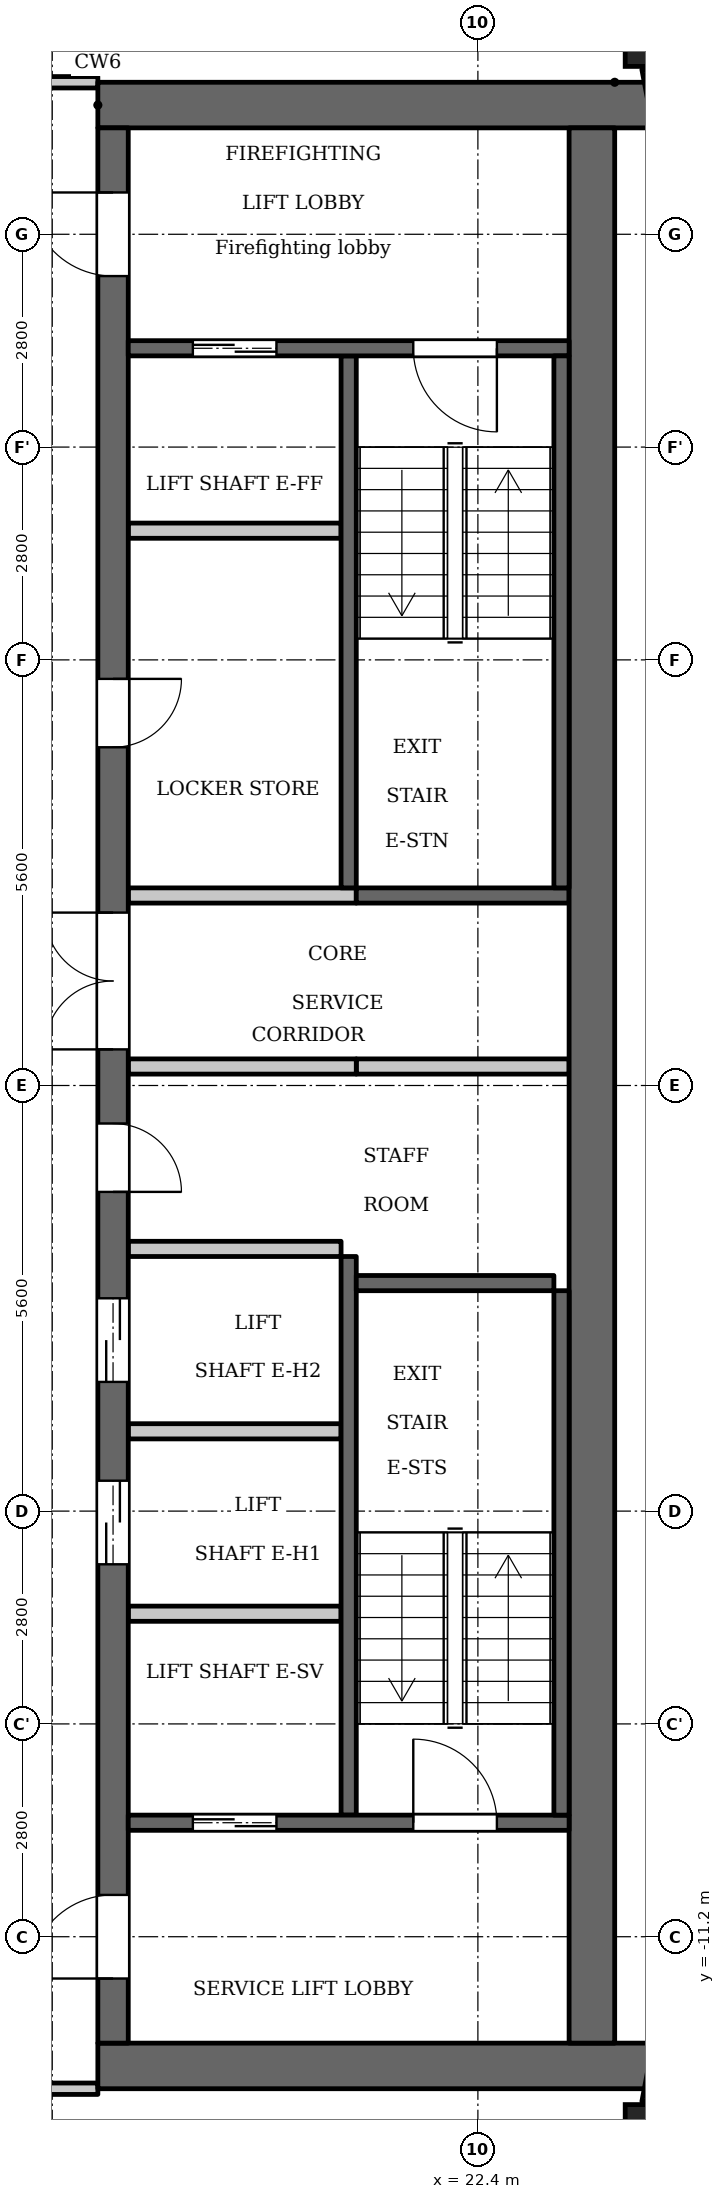
"""IFC4 building model, lengths in metres.
Left out: names, types, materials, properties, quantities, classifications, styles, units other than length and angle.
Written with IfcOpenShell. Run it as: python <this file> out.ifc"""

import sys

from ifc_helpers import new_model, si_unit, direction, frame, frame_2d, origin, origin_2d, place, context, subcontext, project, spatial, rectangle, extrude, element, fill, save


model = new_model("IFC4")
c1 = context("Model", 3, precision=1e-05, world=origin(), true_north=direction((0.0, 1.0)))
c2 = subcontext(c1, "Body", "Model", "MODEL_VIEW")
j1 = project(units=[si_unit("LENGTHUNIT", "METRE"), si_unit("PLANEANGLEUNIT", "RADIAN")], contexts=[c1])
p1 = place(None, origin())
s1 = spatial("IfcSite", under=j1, at=p1, CompositionType="ELEMENT")
p2 = place(p1, origin())
s2 = spatial("IfcBuilding", under=s1, at=p2, CompositionType="ELEMENT")
p3 = place(p2, frame((0.0, 0.0, 255.7)))
s3 = spatial("IfcBuildingStorey", under=s2, at=p3, CompositionType="ELEMENT", Elevation=255.7)
for number, where, z_axis, x_axis in (
    (1, (24.738, -13.809, 0.0), (0.0, 0.0, 1.0), (1.0, 0.0, 0.0)),
    (2, (24.738, 13.809, 0.0), (0.0, 0.0, 1.0), (1.0, 0.0, 0.0)),
):
    element("IfcColumn", number, at=place(p3, frame(where, z_axis=z_axis, x_axis=x_axis)), inside=s3, PredefinedType="COLUMN", context=c2, shape_type="SweptSolid", body=[
        extrude(rectangle(XDim=0.8, YDim=0.8, at=origin_2d()), origin(), (0.0, 0.0, 1.0), 3.5),
    ])
for number, where, z_axis, x_axis in (
    (3, (24.705, -13.395, 0.0), (0.0, 0.0, 1.0), (0.187, 0.982, 0.0)),
    (4, (25.053, 11.572, 0.0), (0.0, 0.0, 1.0), (-0.187, 0.982, 0.0)),
):
    element("IfcWall", number, at=place(p3, frame(where, z_axis=z_axis, x_axis=x_axis)), inside=s3, PredefinedType="SOLIDWALL", context=c2, shape_type="SweptSolid", body=[
        extrude(rectangle(XDim=1.856, YDim=0.3, at=frame_2d((0.928, 0.0))), origin(), (0.0, 0.0, 1.0), 2.55),
    ])
p4 = place(p3, frame((20.7, 2.6, 0.0), z_axis=(0.0, 0.0, 1.0), x_axis=(0.0, 1.0, 0.0)))
e5 = element("IfcWall", 5, at=p4, inside=s3, PredefinedType="SHEAR", context=c2, shape_type="SweptSolid", body=[
    extrude(rectangle(XDim=7.0, YDim=0.2, at=frame_2d((3.5, 0.0))), origin(), (0.0, 0.0, 1.0), 3.2),
])
p5 = place(p3, frame((20.7, -9.6, 0.0), z_axis=(0.0, 0.0, 1.0), x_axis=(0.0, 1.0, 0.0)))
e6 = element("IfcWall", 6, at=p5, inside=s3, PredefinedType="SHEAR", context=c2, shape_type="SweptSolid", body=[
    extrude(rectangle(XDim=7.35, YDim=0.2, at=frame_2d((3.675, 0.0))), origin(), (0.0, 0.0, 1.0), 3.2),
])
p6 = place(p3, frame((20.8, 2.5, 0.0), z_axis=(0.0, 0.0, 1.0), x_axis=(1.0, 0.0, 0.0)))
e7 = element("IfcWall", 7, at=p6, inside=s3, PredefinedType="SHEAR", context=c2, shape_type="SweptSolid", body=[
    extrude(rectangle(XDim=2.8, YDim=0.2, at=frame_2d((1.4, 0.0))), origin(), (0.0, 0.0, 1.0), 3.2),
])
p7 = place(p3, frame((20.8, 0.25, 0.0), z_axis=(0.0, 0.0, 1.0), x_axis=(1.0, 0.0, 0.0)))
e8 = element("IfcWall", 8, at=p7, inside=s3, PredefinedType="PARTITIONING", context=c2, shape_type="SweptSolid", body=[
    extrude(rectangle(XDim=2.8, YDim=0.2, at=frame_2d((1.4, 0.0))), origin(), (0.0, 0.0, 1.0), 3.2),
])
for number, where, z_axis, x_axis in (
    (9, (17.4, 12.9, 0.0), (0.0, 0.0, 1.0), (1.0, 0.0, 0.0)),
    (10, (17.4, -12.9, 0.0), (0.0, 0.0, 1.0), (1.0, 0.0, 0.0)),
):
    element("IfcWall", number, at=place(p3, frame(where, z_axis=z_axis, x_axis=x_axis)), inside=s3, PredefinedType="SHEAR", context=c2, shape_type="SweptSolid", body=[
        extrude(rectangle(XDim=7.32, YDim=0.6, at=frame_2d((3.66, 0.0))), origin(), (0.0, 0.0, 1.0), 3.2),
    ])
p8 = place(p3, frame((17.6, -12.6, 0.0), z_axis=(0.0, 0.0, 1.0), x_axis=(0.0, 1.0, 0.0)))
e11 = element("IfcWall", 11, at=p8, inside=s3, PredefinedType="SHEAR", context=c2, shape_type="SweptSolid", body=[
    extrude(rectangle(XDim=25.2, YDim=0.4, at=frame_2d((12.6, 0.0))), origin(), (0.0, 0.0, 1.0), 3.2),
])
p9 = place(p8, frame((6.3, 0.0, 0.0)))
e12 = element("IfcOpeningElement", 12, at=p9, cuts=e11, PredefinedType="OPENING", context=c2, shape_type="SweptSolid", body=[
    extrude(rectangle(XDim=1.1, YDim=2.1, at=frame_2d((0.55, 1.05))), frame((0.0, 0.21, 0.0), z_axis=(0.0, -1.0, 0.0), x_axis=(1.0, 0.0, 0.0)), (0.0, 0.0, 1.0), 0.42),
])
p10 = place(p8, frame((8.7, 0.0, 0.0)))
e13 = element("IfcOpeningElement", 13, at=p10, cuts=e11, PredefinedType="OPENING", context=c2, shape_type="SweptSolid", body=[
    extrude(rectangle(XDim=1.1, YDim=2.1, at=frame_2d((0.55, 1.05))), frame((0.0, 0.21, 0.0), z_axis=(0.0, -1.0, 0.0), x_axis=(1.0, 0.0, 0.0)), (0.0, 0.0, 1.0), 0.42),
])
p11 = place(p8, frame((11.2, 0.0, 0.0)))
e14 = element("IfcOpeningElement", 14, at=p11, cuts=e11, PredefinedType="OPENING", context=c2, shape_type="SweptSolid", body=[
    extrude(rectangle(XDim=0.9, YDim=2.1, at=frame_2d((0.45, 1.05))), frame((0.0, 0.21, 0.0), z_axis=(0.0, -1.0, 0.0), x_axis=(1.0, 0.0, 0.0)), (0.0, 0.0, 1.0), 0.42),
])
p12 = place(p8, frame((17.05, 0.0, 0.0)))
e15 = element("IfcOpeningElement", 15, at=p12, cuts=e11, PredefinedType="OPENING", context=c2, shape_type="SweptSolid", body=[
    extrude(rectangle(XDim=0.9, YDim=2.1, at=frame_2d((0.45, 1.05))), frame((0.0, 0.21, 0.0), z_axis=(0.0, -1.0, 0.0), x_axis=(1.0, 0.0, 0.0)), (0.0, 0.0, 1.0), 0.42),
])
p13 = place(p8, frame((23.25, 0.0, 0.0)))
e16 = element("IfcOpeningElement", 16, at=p13, cuts=e11, PredefinedType="OPENING", context=c2, shape_type="SweptSolid", body=[
    extrude(rectangle(XDim=1.1, YDim=2.1, at=frame_2d((0.55, 1.05))), frame((0.0, 0.21, 0.0), z_axis=(0.0, -1.0, 0.0), x_axis=(1.0, 0.0, 0.0)), (0.0, 0.0, 1.0), 0.42),
])
p14 = place(p8, frame((0.85, 0.0, 0.0)))
e17 = element("IfcOpeningElement", 17, at=p14, cuts=e11, PredefinedType="OPENING", context=c2, shape_type="SweptSolid", body=[
    extrude(rectangle(XDim=1.1, YDim=2.1, at=frame_2d((0.55, 1.05))), frame((0.0, 0.21, 0.0), z_axis=(0.0, -1.0, 0.0), x_axis=(1.0, 0.0, 0.0)), (0.0, 0.0, 1.0), 0.42),
])
p15 = place(p8, frame((13.075, 0.0, 0.0)))
e18 = element("IfcOpeningElement", 18, at=p15, cuts=e11, PredefinedType="OPENING", context=c2, shape_type="SweptSolid", body=[
    extrude(rectangle(XDim=1.8, YDim=2.1, at=frame_2d((0.9, 1.05))), frame((0.0, 0.21, 0.0), z_axis=(0.0, -1.0, 0.0), x_axis=(1.0, 0.0, 0.0)), (0.0, 0.0, 1.0), 0.42),
])
p16 = place(p3, frame((23.9, -12.6, 0.0), z_axis=(0.0, 0.0, 1.0), x_axis=(0.0, 1.0, 0.0)))
e19 = element("IfcWall", 19, at=p16, inside=s3, PredefinedType="SHEAR", context=c2, shape_type="SweptSolid", body=[
    extrude(rectangle(XDim=25.2, YDim=0.6, at=frame_2d((12.6, 0.0))), origin(), (0.0, 0.0, 1.0), 3.2),
])
p17 = place(p3, frame((17.8, -9.7, 0.0), z_axis=(0.0, 0.0, 1.0), x_axis=(1.0, 0.0, 0.0)))
e20 = element("IfcWall", 20, at=p17, inside=s3, PredefinedType="SHEAR", context=c2, shape_type="SweptSolid", body=[
    extrude(rectangle(XDim=5.8, YDim=0.2, at=frame_2d((2.9, 0.0))), origin(), (0.0, 0.0, 1.0), 3.2),
])
p18 = place(p17, frame((0.85, 0.0, 0.0)))
e21 = element("IfcOpeningElement", 21, at=p18, cuts=e20, PredefinedType="OPENING", context=c2, shape_type="SweptSolid", body=[
    extrude(rectangle(XDim=1.1, YDim=2.1, at=frame_2d((0.55, 1.05))), frame((0.0, 0.11, 0.0), z_axis=(0.0, -1.0, 0.0), x_axis=(1.0, 0.0, 0.0)), (0.0, 0.0, 1.0), 0.22),
])
p19 = place(p17, frame((3.75, 0.0, 0.0)))
e22 = element("IfcOpeningElement", 22, at=p19, cuts=e20, PredefinedType="OPENING", context=c2, shape_type="SweptSolid", body=[
    extrude(rectangle(XDim=1.1, YDim=2.1, at=frame_2d((0.55, 1.05))), frame((0.0, 0.11, 0.0), z_axis=(0.0, -1.0, 0.0), x_axis=(1.0, 0.0, 0.0)), (0.0, 0.0, 1.0), 0.22),
])
for number, where, z_axis, x_axis in (
    (23, (17.8, -6.95, 0.0), (0.0, 0.0, 1.0), (1.0, 0.0, 0.0)),
    (24, (17.8, -4.55, 0.0), (0.0, 0.0, 1.0), (1.0, 0.0, 0.0)),
    (25, (17.8, -2.15, 0.0), (0.0, 0.0, 1.0), (1.0, 0.0, 0.0)),
):
    element("IfcWall", number, at=place(p3, frame(where, z_axis=z_axis, x_axis=x_axis)), inside=s3, PredefinedType="PARTITIONING", context=c2, shape_type="SweptSolid", body=[
        extrude(rectangle(XDim=2.8, YDim=0.2, at=frame_2d((1.4, 0.0))), origin(), (0.0, 0.0, 1.0), 3.2),
    ])
for number, where, z_axis, x_axis in (
    (26, (17.8, 0.25, 0.0), (0.0, 0.0, 1.0), (1.0, 0.0, 0.0)),
    (27, (17.8, 2.5, 0.0), (0.0, 0.0, 1.0), (1.0, 0.0, 0.0)),
):
    element("IfcWall", number, at=place(p3, frame(where, z_axis=z_axis, x_axis=x_axis)), inside=s3, PredefinedType="PARTITIONING", context=c2, shape_type="SweptSolid", body=[
        extrude(rectangle(XDim=3.0, YDim=0.2, at=frame_2d((1.5, 0.0))), origin(), (0.0, 0.0, 1.0), 3.2),
    ])
p20 = place(p3, frame((17.8, 7.3, 0.0), z_axis=(0.0, 0.0, 1.0), x_axis=(1.0, 0.0, 0.0)))
e28 = element("IfcWall", 28, at=p20, inside=s3, PredefinedType="PARTITIONING", context=c2, shape_type="SweptSolid", body=[
    extrude(rectangle(XDim=2.8, YDim=0.2, at=frame_2d((1.4, 0.0))), origin(), (0.0, 0.0, 1.0), 3.2),
])
p21 = place(p3, frame((17.8, 9.7, 0.0), z_axis=(0.0, 0.0, 1.0), x_axis=(1.0, 0.0, 0.0)))
e29 = element("IfcWall", 29, at=p21, inside=s3, PredefinedType="SHEAR", context=c2, shape_type="SweptSolid", body=[
    extrude(rectangle(XDim=5.8, YDim=0.2, at=frame_2d((2.9, 0.0))), origin(), (0.0, 0.0, 1.0), 3.2),
])
p22 = place(p21, frame((0.85, 0.0, 0.0)))
e30 = element("IfcOpeningElement", 30, at=p22, cuts=e29, PredefinedType="OPENING", context=c2, shape_type="SweptSolid", body=[
    extrude(rectangle(XDim=1.1, YDim=2.1, at=frame_2d((0.55, 1.05))), frame((0.0, 0.11, 0.0), z_axis=(0.0, -1.0, 0.0), x_axis=(1.0, 0.0, 0.0)), (0.0, 0.0, 1.0), 0.22),
])
p23 = place(p21, frame((3.75, 0.0, 0.0)))
e31 = element("IfcOpeningElement", 31, at=p23, cuts=e29, PredefinedType="OPENING", context=c2, shape_type="SweptSolid", body=[
    extrude(rectangle(XDim=1.1, YDim=2.1, at=frame_2d((0.55, 1.05))), frame((0.0, 0.11, 0.0), z_axis=(0.0, -1.0, 0.0), x_axis=(1.0, 0.0, 0.0)), (0.0, 0.0, 1.0), 0.22),
])
p24 = place(p3, frame((23.5, 2.6, 0.0), z_axis=(0.0, 0.0, 1.0), x_axis=(0.0, 1.0, 0.0)))
e32 = element("IfcWall", 32, at=p24, inside=s3, PredefinedType="SHEAR", context=c2, shape_type="SweptSolid", body=[
    extrude(rectangle(XDim=7.0, YDim=0.2, at=frame_2d((3.5, 0.0))), origin(), (0.0, 0.0, 1.0), 3.2),
])
p25 = place(p3, frame((23.5, -9.6, 0.0), z_axis=(0.0, 0.0, 1.0), x_axis=(0.0, 1.0, 0.0)))
e33 = element("IfcWall", 33, at=p25, inside=s3, PredefinedType="SHEAR", context=c2, shape_type="SweptSolid", body=[
    extrude(rectangle(XDim=6.9, YDim=0.2, at=frame_2d((3.45, 0.0))), origin(), (0.0, 0.0, 1.0), 3.2),
])
p26 = place(p3, frame((20.8, -2.6, 0.0), z_axis=(0.0, 0.0, 1.0), x_axis=(1.0, 0.0, 0.0)))
e34 = element("IfcWall", 34, at=p26, inside=s3, PredefinedType="SHEAR", context=c2, shape_type="SweptSolid", body=[
    extrude(rectangle(XDim=2.6, YDim=0.2, at=frame_2d((1.3, 0.0))), origin(), (0.0, 0.0, 1.0), 3.2),
])
p27 = place(p3, frame((15.075, -13.2, 0.0), z_axis=(0.0, 0.0, 1.0), x_axis=(1.0, 0.0, 0.0)))
e35 = element("IfcWall", 35, at=p27, inside=s3, PredefinedType="PARTITIONING", context=c2, shape_type="SweptSolid", body=[
    extrude(rectangle(XDim=2.325, YDim=0.15, at=frame_2d((1.163, 0.0))), origin(), (0.0, 0.0, 1.0), 3.2),
])
p28 = place(p27, frame((0.575, 0.0, 0.0)))
e36 = element("IfcOpeningElement", 36, at=p28, cuts=e35, PredefinedType="OPENING", context=c2, shape_type="SweptSolid", body=[
    extrude(rectangle(XDim=1.0, YDim=2.1, at=frame_2d((0.5, 1.05))), frame((0.0, 0.085, 0.0), z_axis=(0.0, -1.0, 0.0), x_axis=(1.0, 0.0, 0.0)), (0.0, 0.0, 1.0), 0.17),
])
p29 = place(p3, frame((15.075, 13.2, 0.0), z_axis=(0.0, 0.0, 1.0), x_axis=(1.0, 0.0, 0.0)))
e37 = element("IfcWall", 37, at=p29, inside=s3, PredefinedType="PARTITIONING", context=c2, shape_type="SweptSolid", body=[
    extrude(rectangle(XDim=2.325, YDim=0.15, at=frame_2d((1.163, 0.0))), origin(), (0.0, 0.0, 1.0), 3.2),
])
p30 = place(p29, frame((0.675, 0.0, 0.0)))
e38 = element("IfcOpeningElement", 38, at=p30, cuts=e37, PredefinedType="OPENING", context=c2, shape_type="SweptSolid", body=[
    extrude(rectangle(XDim=1.0, YDim=2.1, at=frame_2d((0.5, 1.05))), frame((0.0, 0.085, 0.0), z_axis=(0.0, -1.0, 0.0), x_axis=(1.0, 0.0, 0.0)), (0.0, 0.0, 1.0), 0.17),
])
p31 = place(p18, origin())
e39 = element("IfcDoor", 39, at=p31, inside=s3, OperationType="DOUBLE_DOOR_SLIDING", PredefinedType="DOOR", context=c2, shape_type="SweptSolid", body=[
    extrude(rectangle(XDim=1.1, YDim=2.1, at=frame_2d((0.55, 1.05))), frame((0.0, 0.025, 0.0), z_axis=(0.0, -1.0, 0.0), x_axis=(1.0, 0.0, 0.0)), (0.0, 0.0, 1.0), 0.05),
])
fill(e21, e39)
p32 = place(p9, origin())
e40 = element("IfcDoor", 40, at=p32, inside=s3, OperationType="DOUBLE_DOOR_SLIDING", PredefinedType="DOOR", context=c2, shape_type="SweptSolid", body=[
    extrude(rectangle(XDim=1.1, YDim=2.1, at=frame_2d((0.55, 1.05))), frame((0.0, 0.025, 0.0), z_axis=(0.0, -1.0, 0.0), x_axis=(1.0, 0.0, 0.0)), (0.0, 0.0, 1.0), 0.05),
])
fill(e12, e40)
p33 = place(p10, origin())
e41 = element("IfcDoor", 41, at=p33, inside=s3, OperationType="DOUBLE_DOOR_SLIDING", PredefinedType="DOOR", context=c2, shape_type="SweptSolid", body=[
    extrude(rectangle(XDim=1.1, YDim=2.1, at=frame_2d((0.55, 1.05))), frame((0.0, 0.025, 0.0), z_axis=(0.0, -1.0, 0.0), x_axis=(1.0, 0.0, 0.0)), (0.0, 0.0, 1.0), 0.05),
])
fill(e13, e41)
p34 = place(p11, origin())
e42 = element("IfcDoor", 42, at=p34, inside=s3, OperationType="SINGLE_SWING_LEFT", PredefinedType="DOOR", context=c2, shape_type="SweptSolid", body=[
    extrude(rectangle(XDim=0.9, YDim=2.1, at=frame_2d((0.45, 1.05))), frame((0.0, 0.025, 0.0), z_axis=(0.0, -1.0, 0.0), x_axis=(1.0, 0.0, 0.0)), (0.0, 0.0, 1.0), 0.05),
])
fill(e14, e42)
p35 = place(p12, origin())
e43 = element("IfcDoor", 43, at=p35, inside=s3, OperationType="SINGLE_SWING_RIGHT", PredefinedType="DOOR", context=c2, shape_type="SweptSolid", body=[
    extrude(rectangle(XDim=0.9, YDim=2.1, at=frame_2d((0.45, 1.05))), frame((0.0, 0.025, 0.0), z_axis=(0.0, -1.0, 0.0), x_axis=(1.0, 0.0, 0.0)), (0.0, 0.0, 1.0), 0.05),
])
fill(e15, e43)
p36 = place(p22, origin())
e44 = element("IfcDoor", 44, at=p36, inside=s3, OperationType="DOUBLE_DOOR_SLIDING", PredefinedType="DOOR", context=c2, shape_type="SweptSolid", body=[
    extrude(rectangle(XDim=1.1, YDim=2.1, at=frame_2d((0.55, 1.05))), frame((0.0, 0.025, 0.0), z_axis=(0.0, -1.0, 0.0), x_axis=(1.0, 0.0, 0.0)), (0.0, 0.0, 1.0), 0.05),
])
fill(e30, e44)
p37 = place(p13, origin())
e45 = element("IfcDoor", 45, at=p37, inside=s3, OperationType="SINGLE_SWING_LEFT", PredefinedType="DOOR", context=c2, shape_type="SweptSolid", body=[
    extrude(rectangle(XDim=1.1, YDim=2.1, at=frame_2d((0.55, 1.05))), frame((0.0, 0.025, 0.0), z_axis=(0.0, -1.0, 0.0), x_axis=(1.0, 0.0, 0.0)), (0.0, 0.0, 1.0), 0.05),
])
fill(e16, e45)
p38 = place(p14, origin())
e46 = element("IfcDoor", 46, at=p38, inside=s3, OperationType="SINGLE_SWING_RIGHT", PredefinedType="DOOR", context=c2, shape_type="SweptSolid", body=[
    extrude(rectangle(XDim=1.1, YDim=2.1, at=frame_2d((0.55, 1.05))), frame((0.0, 0.025, 0.0), z_axis=(0.0, -1.0, 0.0), x_axis=(1.0, 0.0, 0.0)), (0.0, 0.0, 1.0), 0.05),
])
fill(e17, e46)
p39 = place(p23, origin())
e47 = element("IfcDoor", 47, at=p39, inside=s3, OperationType="SINGLE_SWING_RIGHT", PredefinedType="DOOR", context=c2, shape_type="SweptSolid", body=[
    extrude(rectangle(XDim=1.1, YDim=2.1, at=frame_2d((0.55, 1.05))), frame((0.0, 0.025, 0.0), z_axis=(0.0, -1.0, 0.0), x_axis=(1.0, 0.0, 0.0)), (0.0, 0.0, 1.0), 0.05),
])
fill(e31, e47)
p40 = place(p19, origin())
e48 = element("IfcDoor", 48, at=p40, inside=s3, OperationType="SINGLE_SWING_RIGHT", PredefinedType="DOOR", context=c2, shape_type="SweptSolid", body=[
    extrude(rectangle(XDim=1.1, YDim=2.1, at=frame_2d((0.55, 1.05))), frame((0.0, 0.025, 0.0), z_axis=(0.0, -1.0, 0.0), x_axis=(1.0, 0.0, 0.0)), (0.0, 0.0, 1.0), 0.05),
])
fill(e22, e48)
p41 = place(p15, origin())
e49 = element("IfcDoor", 49, at=p41, inside=s3, OperationType="DOUBLE_DOOR_SINGLE_SWING", PredefinedType="DOOR", context=c2, shape_type="SweptSolid", body=[
    extrude(rectangle(XDim=1.8, YDim=2.1, at=frame_2d((0.9, 1.05))), frame((0.0, 0.025, 0.0), z_axis=(0.0, -1.0, 0.0), x_axis=(1.0, 0.0, 0.0)), (0.0, 0.0, 1.0), 0.05),
])
fill(e18, e49)
save(model, sys.argv[1])
